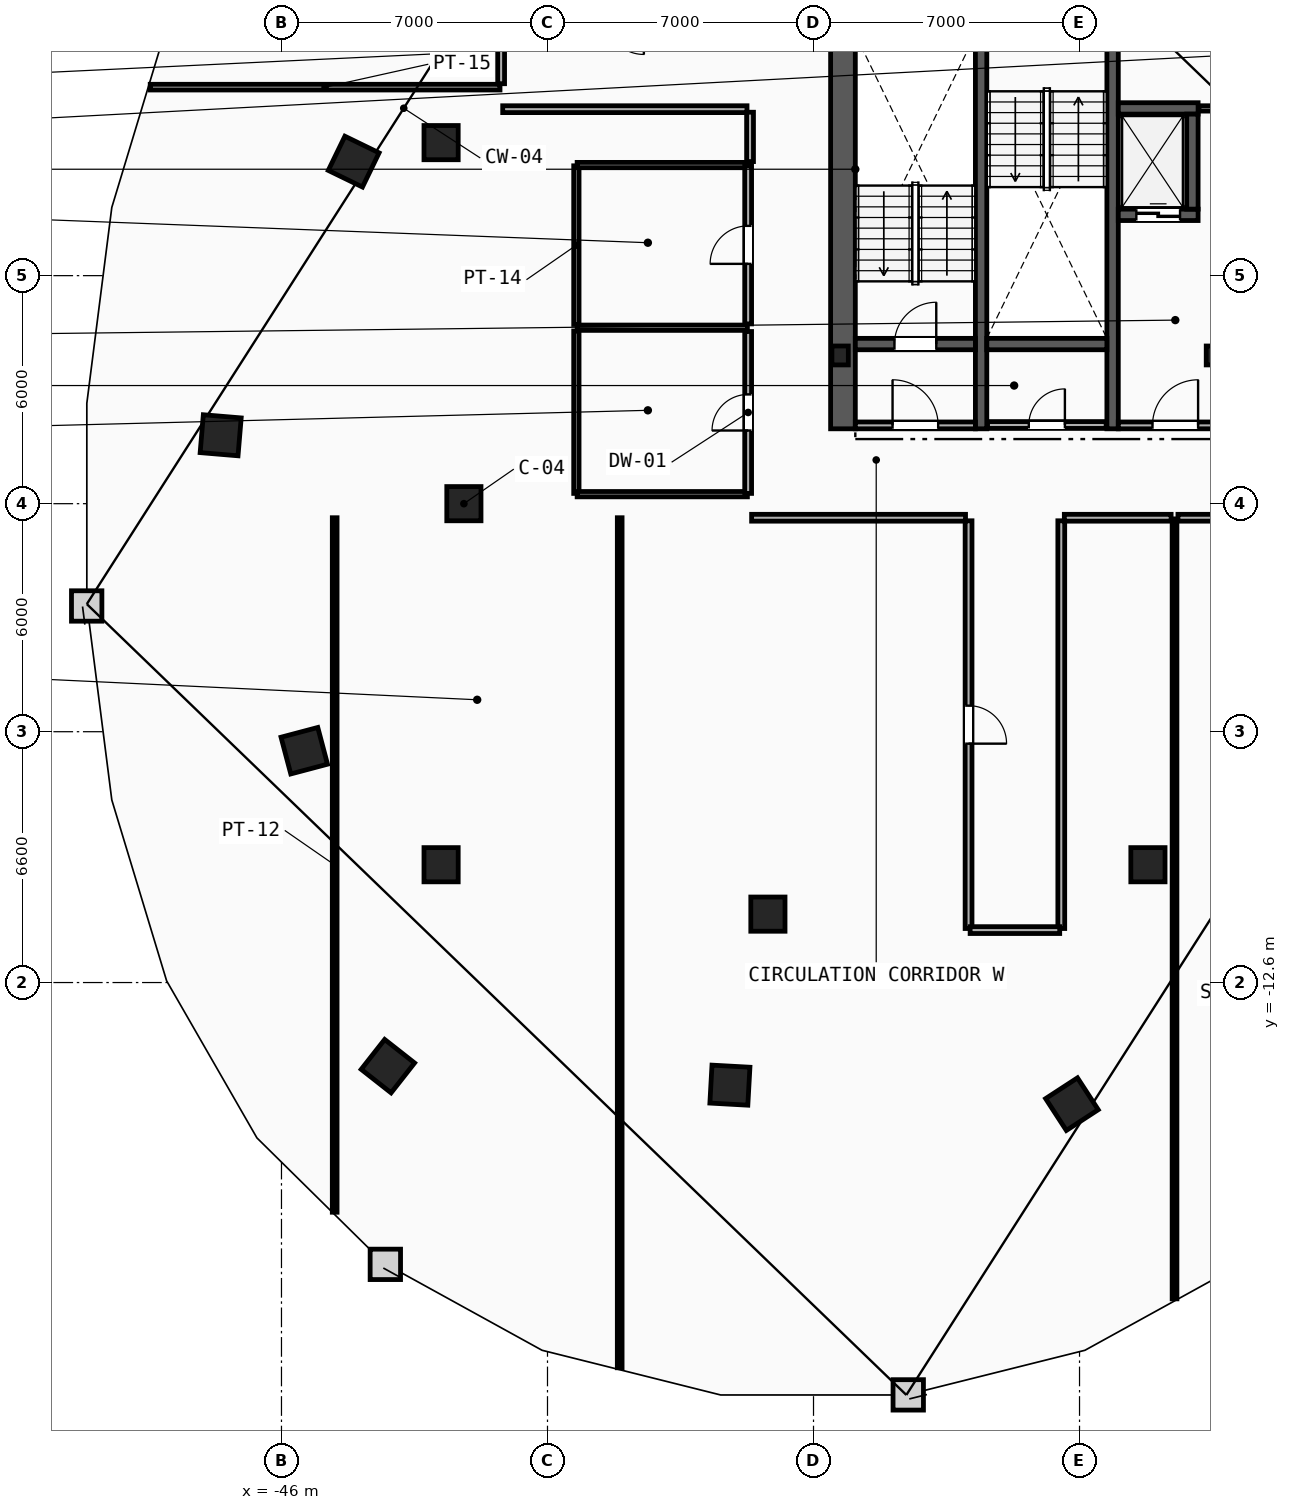
"""IFC4 building model, lengths in metres.
Left out: names, types, materials, properties, quantities, classifications, styles, units other than length and angle.
Written with IfcOpenShell. Run it as: python <this file> out.ifc"""

import sys

from ifc_helpers import new_model, si_unit, direction, frame, frame_2d, origin, origin_2d, place, context, subcontext, project, spatial, rectangle, i_section, extrude, element, fill, save


model = new_model("IFC4")
c1 = context("Model", 3, precision=1e-05, world=origin(), true_north=direction((0.0, 1.0)))
c2 = subcontext(c1, "Body", "Model", "MODEL_VIEW")
j1 = project(units=[si_unit("LENGTHUNIT", "METRE"), si_unit("PLANEANGLEUNIT", "RADIAN")], contexts=[c1])
p1 = place(None, origin())
s1 = spatial("IfcSite", under=j1, at=p1, CompositionType="ELEMENT")
p2 = place(p1, origin())
s2 = spatial("IfcBuilding", under=s1, at=p2, CompositionType="ELEMENT")
p3 = place(p2, frame((0.0, 0.0, 144.0)))
s3 = spatial("IfcBuildingStorey", under=s2, at=p3, CompositionType="ELEMENT", Elevation=144.0)
for number, where, z_axis, x_axis in (
    (1, (-31.3, 3.9, 0.0), (0.0, 0.0, 1.0), (1.0, 0.0, 0.0)),
    (2, (-21.45, 3.9, 0.0), (0.0, 0.0, 1.0), (1.0, 0.0, 0.0)),
):
    element("IfcColumn", number, at=place(p3, frame(where, z_axis=z_axis, x_axis=x_axis)), inside=s3, PredefinedType="COLUMN", context=c2, shape_type="SweptSolid", body=[
        extrude(i_section(OverallWidth=0.432, OverallDepth=0.498, WebThickness=0.056, FlangeThickness=0.089, FilletRadius=0.018, at=origin_2d()), origin(), (0.0, 0.0, 1.0), 3.6),
    ])
for number, where, z_axis, x_axis in (
    (3, (-41.2, 0.0, 0.0), (0.0, 0.0, 1.0), (1.0, 0.0, 0.0)),
    (4, (-41.8, 9.5, 0.0), (0.0, 0.0, 1.0), (1.0, 0.0, 0.0)),
    (5, (-41.8, -9.5, 0.0), (0.0, 0.0, 1.0), (1.0, 0.0, 0.0)),
    (6, (-33.2, -10.8, 0.0), (0.0, 0.0, 1.0), (1.0, 0.0, 0.0)),
    (7, (-23.2, -9.5, 0.0), (0.0, 0.0, 1.0), (1.0, 0.0, 0.0)),
):
    element("IfcColumn", number, at=place(p3, frame(where, z_axis=z_axis, x_axis=x_axis)), inside=s3, PredefinedType="COLUMN", context=c2, shape_type="SweptSolid", body=[
        extrude(rectangle(XDim=0.9, YDim=0.9, at=origin_2d()), origin(), (0.0, 0.0, 1.0), 3.6),
    ])
for number, where, z_axis, x_axis in (
    (8, (-44.1, 9.0, 0.0), (0.0, 0.0, 1.0), (-0.437, -0.899, 0.0)),
    (9, (-47.6, 1.8, 0.0), (0.0, 0.0, 1.0), (-0.084, -0.997, 0.0)),
    (10, (-45.4, -6.5, 0.0), (0.0, 0.0, 1.0), (0.256, -0.967, 0.0)),
    (11, (-43.2, -14.8, 0.0), (0.0, 0.0, 1.0), (0.786, -0.618, 0.0)),
    (12, (-34.2, -15.3, 0.0), (0.0, 0.0, 1.0), (0.998, -0.055, 0.0)),
    (13, (-25.2, -15.8, 0.0), (0.0, 0.0, 1.0), (0.838, 0.546, 0.0)),
):
    element("IfcColumn", number, at=place(p3, frame(where, z_axis=z_axis, x_axis=x_axis)), inside=s3, PredefinedType="COLUMN", context=c2, shape_type="SweptSolid", body=[
        extrude(rectangle(XDim=1.0, YDim=1.0, at=origin_2d()), origin(), (0.0, 0.0, 1.0), 3.6),
    ])
p4 = place(p3, frame((-31.225, 1.97, 0.0), z_axis=(0.0, 0.0, 1.0), x_axis=(0.0, 1.0, 0.0)))
e14 = element("IfcWall", 14, at=p4, inside=s3, PredefinedType="SHEAR", context=c2, shape_type="SweptSolid", body=[
    extrude(rectangle(XDim=13.33, YDim=0.65, at=frame_2d((6.665, 0.0))), origin(), (0.0, 0.0, 1.0), 3.36),
])
for number, where, z_axis, x_axis in (
    (15, (-27.59, 1.97, 0.0), (0.0, 0.0, 1.0), (0.0, 1.0, 0.0)),
    (16, (-24.13, 1.97, 0.0), (0.0, 0.0, 1.0), (0.0, 1.0, 0.0)),
):
    element("IfcWall", number, at=place(p3, frame(where, z_axis=z_axis, x_axis=x_axis)), inside=s3, PredefinedType="SHEAR", context=c2, shape_type="SweptSolid", body=[
        extrude(rectangle(XDim=10.68, YDim=0.3, at=frame_2d((5.34, 0.0))), origin(), (0.0, 0.0, 1.0), 3.36),
    ])
p5 = place(p3, frame((-30.9, 4.2, 0.0), z_axis=(0.0, 0.0, 1.0), x_axis=(1.0, 0.0, 0.0)))
e17 = element("IfcWall", 17, at=p5, inside=s3, PredefinedType="SHEAR", context=c2, shape_type="SweptSolid", body=[
    extrude(rectangle(XDim=3.16, YDim=0.3, at=frame_2d((1.58, 0.0))), origin(), (0.0, 0.0, 1.0), 3.36),
])
p6 = place(p5, frame((1.03, 0.0, 0.0)))
e18 = element("IfcOpeningElement", 18, at=p6, cuts=e17, PredefinedType="OPENING", context=c2, shape_type="SweptSolid", body=[
    extrude(rectangle(XDim=1.1, YDim=2.15, at=frame_2d((0.55, 1.075))), frame((0.0, 0.16, 0.0), z_axis=(0.0, -1.0, 0.0), x_axis=(1.0, 0.0, 0.0)), (0.0, 0.0, 1.0), 0.32),
])
p7 = place(p3, frame((-27.44, 4.2, 0.0), z_axis=(0.0, 0.0, 1.0), x_axis=(1.0, 0.0, 0.0)))
e19 = element("IfcWall", 19, at=p7, inside=s3, PredefinedType="SHEAR", context=c2, shape_type="SweptSolid", body=[
    extrude(rectangle(XDim=3.16, YDim=0.3, at=frame_2d((1.58, 0.0))), origin(), (0.0, 0.0, 1.0), 3.36),
])
p8 = place(p3, frame((-23.98, 2.06, 0.0), z_axis=(0.0, 0.0, 1.0), x_axis=(1.0, 0.0, 0.0)))
e20 = element("IfcWall", 20, at=p8, inside=s3, PredefinedType="PARTITIONING", context=c2, shape_type="SweptSolid", body=[
    extrude(rectangle(XDim=3.0, YDim=0.18, at=frame_2d((1.5, 0.0))), origin(), (0.0, 0.0, 1.0), 3.36),
])
p9 = place(p8, frame((0.9, 0.0, 0.0)))
e21 = element("IfcOpeningElement", 21, at=p9, cuts=e20, PredefinedType="OPENING", context=c2, shape_type="SweptSolid", body=[
    extrude(rectangle(XDim=1.2, YDim=2.15, at=frame_2d((0.6, 1.075))), frame((0.0, 0.1, 0.0), z_axis=(0.0, -1.0, 0.0), x_axis=(1.0, 0.0, 0.0)), (0.0, 0.0, 1.0), 0.2),
])
p10 = place(p3, frame((-30.9, 2.06, 0.0), z_axis=(0.0, 0.0, 1.0), x_axis=(1.0, 0.0, 0.0)))
e22 = element("IfcWall", 22, at=p10, inside=s3, PredefinedType="PARTITIONING", context=c2, shape_type="SweptSolid", body=[
    extrude(rectangle(XDim=3.16, YDim=0.18, at=frame_2d((1.58, 0.0))), origin(), (0.0, 0.0, 1.0), 3.36),
])
p11 = place(p10, frame((0.98, 0.0, 0.0)))
e23 = element("IfcOpeningElement", 23, at=p11, cuts=e22, PredefinedType="OPENING", context=c2, shape_type="SweptSolid", body=[
    extrude(rectangle(XDim=1.2, YDim=2.15, at=frame_2d((0.6, 1.075))), frame((0.0, 0.1, 0.0), z_axis=(0.0, -1.0, 0.0), x_axis=(1.0, 0.0, 0.0)), (0.0, 0.0, 1.0), 0.2),
])
p12 = place(p3, frame((-23.98, 7.6, 0.0), z_axis=(0.0, 0.0, 1.0), x_axis=(1.0, 0.0, 0.0)))
e24 = element("IfcWall", 24, at=p12, inside=s3, PredefinedType="SHEAR", context=c2, shape_type="SweptSolid", body=[
    extrude(rectangle(XDim=2.1, YDim=0.3, at=frame_2d((1.05, 0.0))), origin(), (0.0, 0.0, 1.0), 3.36),
])
p13 = place(p12, frame((0.475, 0.0, 0.0)))
e25 = element("IfcOpeningElement", 25, at=p13, cuts=e24, PredefinedType="OPENING", context=c2, shape_type="SweptSolid", body=[
    extrude(rectangle(XDim=1.15, YDim=2.2, at=frame_2d((0.575, 1.1))), frame((0.0, 0.16, 0.0), z_axis=(0.0, -1.0, 0.0), x_axis=(1.0, 0.0, 0.0)), (0.0, 0.0, 1.0), 0.32),
])
p14 = place(p3, frame((-23.98, 10.4, 0.0), z_axis=(0.0, 0.0, 1.0), x_axis=(1.0, 0.0, 0.0)))
e26 = element("IfcWall", 26, at=p14, inside=s3, PredefinedType="SHEAR", context=c2, shape_type="SweptSolid", body=[
    extrude(rectangle(XDim=2.1, YDim=0.3, at=frame_2d((1.05, 0.0))), origin(), (0.0, 0.0, 1.0), 3.36),
])
p15 = place(p3, frame((-22.03, 7.75, 0.0), z_axis=(0.0, 0.0, 1.0), x_axis=(0.0, 1.0, 0.0)))
e27 = element("IfcWall", 27, at=p15, inside=s3, PredefinedType="SHEAR", context=c2, shape_type="SweptSolid", body=[
    extrude(rectangle(XDim=2.5, YDim=0.3, at=frame_2d((1.25, 0.0))), origin(), (0.0, 0.0, 1.0), 3.36),
])
p16 = place(p3, frame((-21.86, 10.4, 0.0), z_axis=(0.0, 0.0, 1.0), x_axis=(1.0, 0.0, 0.0)))
e28 = element("IfcWall", 28, at=p16, inside=s3, PredefinedType="PARTITIONING", context=c2, shape_type="SweptSolid", body=[
    extrude(rectangle(XDim=0.59, YDim=0.14, at=frame_2d((0.295, 0.0))), origin(), (0.0, 0.0, 1.0), 3.36),
])
p17 = place(p3, frame((-27.42, 2.07, 0.0), z_axis=(0.0, 0.0, 1.0), x_axis=(1.0, 0.0, 0.0)))
e29 = element("IfcWall", 29, at=p17, inside=s3, PredefinedType="PARTITIONING", context=c2, shape_type="SweptSolid", body=[
    extrude(rectangle(XDim=3.12, YDim=0.18, at=frame_2d((1.56, 0.0))), origin(), (0.0, 0.0, 1.0), 3.36),
])
p18 = place(p17, frame((1.085, 0.0, 0.0)))
e30 = element("IfcOpeningElement", 30, at=p18, cuts=e29, PredefinedType="OPENING", context=c2, shape_type="SweptSolid", body=[
    extrude(rectangle(XDim=0.95, YDim=2.1, at=frame_2d((0.475, 1.05))), frame((0.0, 0.1, 0.0), z_axis=(0.0, -1.0, 0.0), x_axis=(1.0, 0.0, 0.0)), (0.0, 0.0, 1.0), 0.2),
])
p19 = place(p3, frame((-38.24, 0.27, 0.0), z_axis=(0.0, 0.0, 1.0), x_axis=(0.0, 1.0, 0.0)))
e31 = element("IfcWall", 31, at=p19, inside=s3, PredefinedType="PARTITIONING", context=c2, shape_type="SweptSolid", body=[
    extrude(rectangle(XDim=4.275, YDim=0.14, at=frame_2d((2.137, 0.0))), origin(), (0.0, 0.0, 1.0), 3.36),
])
p20 = place(p3, frame((-38.24, 4.715, 0.0), z_axis=(0.0, 0.0, 1.0), x_axis=(0.0, 1.0, 0.0)))
e32 = element("IfcWall", 32, at=p20, inside=s3, PredefinedType="PARTITIONING", context=c2, shape_type="SweptSolid", body=[
    extrude(rectangle(XDim=4.175, YDim=0.14, at=frame_2d((2.087, 0.0))), origin(), (0.0, 0.0, 1.0), 3.36),
])
for number, where, z_axis, x_axis in (
    (33, (-38.22, 0.25, 0.0), (0.0, 0.0, 1.0), (1.0, 0.0, 0.0)),
    (34, (-38.22, 4.63, 0.0), (0.0, 0.0, 1.0), (1.0, 0.0, 0.0)),
    (35, (-38.22, 8.91, 0.0), (0.0, 0.0, 1.0), (1.0, 0.0, 0.0)),
):
    element("IfcWall", number, at=place(p3, frame(where, z_axis=z_axis, x_axis=x_axis)), inside=s3, PredefinedType="PARTITIONING", context=c2, shape_type="SweptSolid", body=[
        extrude(rectangle(XDim=4.48, YDim=0.14, at=frame_2d((2.24, 0.0))), origin(), (0.0, 0.0, 1.0), 3.36),
    ])
p21 = place(p3, frame((-33.72, 0.27, 0.0), z_axis=(0.0, 0.0, 1.0), x_axis=(0.0, 1.0, 0.0)))
e36 = element("IfcWall", 36, at=p21, inside=s3, PredefinedType="PARTITIONING", context=c2, shape_type="SweptSolid", body=[
    extrude(rectangle(XDim=4.26, YDim=0.18, at=frame_2d((2.13, 0.0))), origin(), (0.0, 0.0, 1.0), 3.36),
])
p22 = place(p21, frame((1.655, 0.0, 0.0)))
e37 = element("IfcOpeningElement", 37, at=p22, cuts=e36, PredefinedType="OPENING", context=c2, shape_type="SweptSolid", body=[
    extrude(rectangle(XDim=0.95, YDim=2.1, at=frame_2d((0.475, 1.05))), frame((0.0, 0.1, 0.0), z_axis=(0.0, -1.0, 0.0), x_axis=(1.0, 0.0, 0.0)), (0.0, 0.0, 1.0), 0.2),
])
p23 = place(p3, frame((-33.72, 4.73, 0.0), z_axis=(0.0, 0.0, 1.0), x_axis=(0.0, 1.0, 0.0)))
e38 = element("IfcWall", 38, at=p23, inside=s3, PredefinedType="PARTITIONING", context=c2, shape_type="SweptSolid", body=[
    extrude(rectangle(XDim=4.16, YDim=0.18, at=frame_2d((2.08, 0.0))), origin(), (0.0, 0.0, 1.0), 3.36),
])
p24 = place(p23, frame((1.58, 0.0, 0.0)))
e39 = element("IfcOpeningElement", 39, at=p24, cuts=e38, PredefinedType="OPENING", context=c2, shape_type="SweptSolid", body=[
    extrude(rectangle(XDim=1.0, YDim=2.15, at=frame_2d((0.5, 1.075))), frame((0.0, 0.1, 0.0), z_axis=(0.0, -1.0, 0.0), x_axis=(1.0, 0.0, 0.0)), (0.0, 0.0, 1.0), 0.2),
])
p25 = place(p3, frame((-44.6, -18.644, 0.0), z_axis=(0.0, 0.0, 1.0), x_axis=(0.0, 1.0, 0.0)))
e40 = element("IfcWall", 40, at=p25, inside=s3, PredefinedType="PARTITIONING", context=c2, shape_type="SweptSolid", body=[
    extrude(rectangle(XDim=18.274, YDim=0.125, at=frame_2d((9.137, 0.0))), origin(), (0.0, 0.0, 1.0), 2.665),
])
p26 = place(p3, frame((-37.1, -22.736, 0.0), z_axis=(0.0, 0.0, 1.0), x_axis=(0.0, 1.0, 0.0)))
e41 = element("IfcWall", 41, at=p26, inside=s3, PredefinedType="PARTITIONING", context=c2, shape_type="SweptSolid", body=[
    extrude(rectangle(XDim=22.366, YDim=0.125, at=frame_2d((11.183, 0.0))), origin(), (0.0, 0.0, 1.0), 3.36),
])
p27 = place(p3, frame((-22.5, -20.923, 0.0), z_axis=(0.0, 0.0, 1.0), x_axis=(0.0, 1.0, 0.0)))
e42 = element("IfcWall", 42, at=p27, inside=s3, PredefinedType="PARTITIONING", context=c2, shape_type="SweptSolid", body=[
    extrude(rectangle(XDim=20.523, YDim=0.125, at=frame_2d((10.262, 0.0))), origin(), (0.0, 0.0, 1.0), 2.665),
])
p28 = place(p3, frame((-49.454, 10.96, 0.0), z_axis=(0.0, 0.0, 1.0), x_axis=(1.0, 0.0, 0.0)))
e43 = element("IfcWall", 43, at=p28, inside=s3, PredefinedType="PARTITIONING", context=c2, shape_type="SweptSolid", body=[
    extrude(rectangle(XDim=9.204, YDim=0.15, at=frame_2d((4.602, 0.0))), origin(), (0.0, 0.0, 1.0), 3.36),
])
p29 = place(p3, frame((-27.92, -0.45, 0.0), z_axis=(0.0, 0.0, 1.0), x_axis=(0.0, -1.0, 0.0)))
e44 = element("IfcWall", 44, at=p29, inside=s3, PredefinedType="PARTITIONING", context=c2, shape_type="SweptSolid", body=[
    extrude(rectangle(XDim=10.729, YDim=0.18, at=frame_2d((5.364, 0.0))), origin(), (0.0, 0.0, 1.0), 3.36),
])
p30 = place(p29, frame((4.864, 0.0, 0.0)))
e45 = element("IfcOpeningElement", 45, at=p30, cuts=e44, PredefinedType="OPENING", context=c2, shape_type="SweptSolid", body=[
    extrude(rectangle(XDim=1.0, YDim=2.15, at=frame_2d((0.5, 1.075))), frame((0.0, 0.1, 0.0), z_axis=(0.0, -1.0, 0.0), x_axis=(1.0, 0.0, 0.0)), (0.0, 0.0, 1.0), 0.2),
])
p31 = place(p3, frame((-25.48, -11.178, 0.0), z_axis=(0.0, 0.0, 1.0), x_axis=(0.0, 1.0, 0.0)))
e46 = element("IfcWall", 46, at=p31, inside=s3, PredefinedType="PARTITIONING", context=c2, shape_type="SweptSolid", body=[
    extrude(rectangle(XDim=10.729, YDim=0.18, at=frame_2d((5.364, 0.0))), origin(), (0.0, 0.0, 1.0), 3.36),
])
p32 = place(p3, frame((-40.178, 10.38, 0.0), z_axis=(0.0, 0.0, 1.0), x_axis=(1.0, 0.0, 0.0)))
e47 = element("IfcWall", 47, at=p32, inside=s3, PredefinedType="PARTITIONING", context=c2, shape_type="SweptSolid", body=[
    extrude(rectangle(XDim=6.428, YDim=0.18, at=frame_2d((3.214, 0.0))), origin(), (0.0, 0.0, 1.0), 3.36),
])
p33 = place(p3, frame((-33.628, -0.37, 0.0), z_axis=(0.0, 0.0, 1.0), x_axis=(1.0, 0.0, 0.0)))
e48 = element("IfcWall", 48, at=p33, inside=s3, PredefinedType="PARTITIONING", context=c2, shape_type="SweptSolid", body=[
    extrude(rectangle(XDim=5.628, YDim=0.18, at=frame_2d((2.814, 0.0))), origin(), (0.0, 0.0, 1.0), 3.36),
])
p34 = place(p3, frame((-25.4, -0.37, 0.0), z_axis=(0.0, 0.0, 1.0), x_axis=(1.0, 0.0, 0.0)))
e49 = element("IfcWall", 49, at=p34, inside=s3, PredefinedType="PARTITIONING", context=c2, shape_type="SweptSolid", body=[
    extrude(rectangle(XDim=2.81, YDim=0.18, at=frame_2d((1.405, 0.0))), origin(), (0.0, 0.0, 1.0), 3.36),
])
p35 = place(p3, frame((-27.878, -11.22, 0.0), z_axis=(0.0, 0.0, 1.0), x_axis=(1.0, 0.0, 0.0)))
e50 = element("IfcWall", 50, at=p35, inside=s3, PredefinedType="PARTITIONING", context=c2, shape_type="SweptSolid", body=[
    extrude(rectangle(XDim=2.357, YDim=0.18, at=frame_2d((1.178, 0.0))), origin(), (0.0, 0.0, 1.0), 3.36),
])
p36 = place(p3, frame((-33.67, 10.3, 0.0), z_axis=(0.0, 0.0, 1.0), x_axis=(0.0, -1.0, 0.0)))
e51 = element("IfcWall", 51, at=p36, inside=s3, PredefinedType="PARTITIONING", context=c2, shape_type="SweptSolid", body=[
    extrude(rectangle(XDim=1.299, YDim=0.18, at=frame_2d((0.649, 0.0))), origin(), (0.0, 0.0, 1.0), 3.36),
])
p37 = place(p3, frame((-22.41, -0.37, 0.0), z_axis=(0.0, 0.0, 1.0), x_axis=(1.0, 0.0, 0.0)))
e52 = element("IfcWall", 52, at=p37, inside=s3, PredefinedType="PARTITIONING", context=c2, shape_type="SweptSolid", body=[
    extrude(rectangle(XDim=5.588, YDim=0.18, at=frame_2d((2.794, 0.0))), origin(), (0.0, 0.0, 1.0), 3.36),
])
p38 = place(p37, frame((2.294, 0.0, 0.0)))
e53 = element("IfcOpeningElement", 53, at=p38, cuts=e52, PredefinedType="OPENING", context=c2, shape_type="SweptSolid", body=[
    extrude(rectangle(XDim=1.0, YDim=2.15, at=frame_2d((0.5, 1.075))), frame((0.0, 0.1, 0.0), z_axis=(0.0, -1.0, 0.0), x_axis=(1.0, 0.0, 0.0)), (0.0, 0.0, 1.0), 0.2),
])
p39 = place(p3, frame((-40.22, 12.779, 0.0), z_axis=(0.0, 0.0, 1.0), x_axis=(0.0, -1.0, 0.0)))
e54 = element("IfcWall", 54, at=p39, inside=s3, PredefinedType="PARTITIONING", context=c2, shape_type="SweptSolid", body=[
    extrude(rectangle(XDim=1.729, YDim=0.18, at=frame_2d((0.864, 0.0))), origin(), (0.0, 0.0, 1.0), 3.36),
])
p40 = place(p6, origin())
e55 = element("IfcDoor", 55, at=p40, inside=s3, OperationType="SINGLE_SWING_RIGHT", PredefinedType="DOOR", context=c2, shape_type="SweptSolid", body=[
    extrude(rectangle(XDim=1.1, YDim=2.15, at=frame_2d((0.55, 1.075))), frame((0.0, 0.025, 0.0), z_axis=(0.0, -1.0, 0.0), x_axis=(1.0, 0.0, 0.0)), (0.0, 0.0, 1.0), 0.05),
])
fill(e18, e55)
p41 = place(p9, origin())
e56 = element("IfcDoor", 56, at=p41, inside=s3, OperationType="SINGLE_SWING_RIGHT", PredefinedType="DOOR", context=c2, shape_type="SweptSolid", body=[
    extrude(rectangle(XDim=1.2, YDim=2.15, at=frame_2d((0.6, 1.075))), frame((0.0, 0.025, 0.0), z_axis=(0.0, -1.0, 0.0), x_axis=(1.0, 0.0, 0.0)), (0.0, 0.0, 1.0), 0.05),
])
fill(e21, e56)
p42 = place(p11, origin())
e57 = element("IfcDoor", 57, at=p42, inside=s3, OperationType="SINGLE_SWING_LEFT", PredefinedType="DOOR", context=c2, shape_type="SweptSolid", body=[
    extrude(rectangle(XDim=1.2, YDim=2.15, at=frame_2d((0.6, 1.075))), frame((0.0, 0.025, 0.0), z_axis=(0.0, -1.0, 0.0), x_axis=(1.0, 0.0, 0.0)), (0.0, 0.0, 1.0), 0.05),
])
fill(e23, e57)
p43 = place(p13, origin())
e58 = element("IfcDoor", 58, at=p43, inside=s3, OperationType="SLIDING_TO_LEFT", PredefinedType="TRAPDOOR", context=c2, shape_type="SweptSolid", body=[
    extrude(rectangle(XDim=1.15, YDim=2.2, at=frame_2d((0.575, 1.1))), frame((0.0, 0.025, 0.0), z_axis=(0.0, -1.0, 0.0), x_axis=(1.0, 0.0, 0.0)), (0.0, 0.0, 1.0), 0.05),
])
fill(e25, e58)
p44 = place(p30, origin())
e59 = element("IfcDoor", 59, at=p44, inside=s3, OperationType="SINGLE_SWING_RIGHT", PredefinedType="DOOR", context=c2, shape_type="SweptSolid", body=[
    extrude(rectangle(XDim=1.0, YDim=2.15, at=frame_2d((0.5, 1.075))), frame((0.0, 0.025, 0.0), z_axis=(0.0, -1.0, 0.0), x_axis=(1.0, 0.0, 0.0)), (0.0, 0.0, 1.0), 0.05),
])
fill(e45, e59)
p45 = place(p22, origin())
e60 = element("IfcDoor", 60, at=p45, inside=s3, OperationType="SINGLE_SWING_LEFT", PredefinedType="DOOR", context=c2, shape_type="SweptSolid", body=[
    extrude(rectangle(XDim=0.95, YDim=2.1, at=frame_2d((0.475, 1.05))), frame((0.0, 0.025, 0.0), z_axis=(0.0, -1.0, 0.0), x_axis=(1.0, 0.0, 0.0)), (0.0, 0.0, 1.0), 0.05),
])
fill(e37, e60)
p46 = place(p24, origin())
e61 = element("IfcDoor", 61, at=p46, inside=s3, OperationType="SINGLE_SWING_LEFT", PredefinedType="DOOR", context=c2, shape_type="SweptSolid", body=[
    extrude(rectangle(XDim=1.0, YDim=2.15, at=frame_2d((0.5, 1.075))), frame((0.0, 0.025, 0.0), z_axis=(0.0, -1.0, 0.0), x_axis=(1.0, 0.0, 0.0)), (0.0, 0.0, 1.0), 0.05),
])
fill(e39, e61)
p47 = place(p18, origin())
e62 = element("IfcDoor", 62, at=p47, inside=s3, OperationType="SINGLE_SWING_RIGHT", PredefinedType="DOOR", context=c2, shape_type="SweptSolid", body=[
    extrude(rectangle(XDim=0.95, YDim=2.1, at=frame_2d((0.475, 1.05))), frame((0.0, 0.025, 0.0), z_axis=(0.0, -1.0, 0.0), x_axis=(1.0, 0.0, 0.0)), (0.0, 0.0, 1.0), 0.05),
])
fill(e30, e62)
save(model, sys.argv[1])
